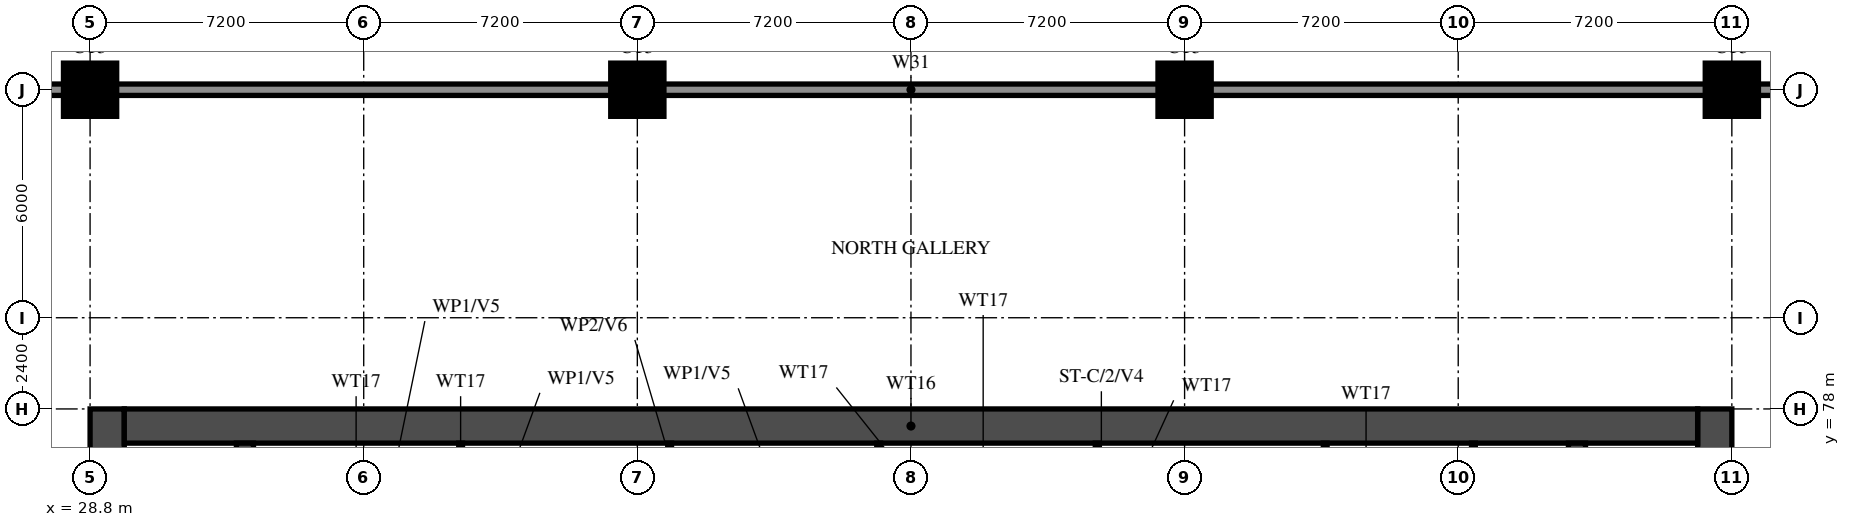
"""IFC4 building model, lengths in metres.
Left out: names, types, materials, properties, quantities, classifications, styles, units other than length and angle.
Written with IfcOpenShell. Run it as: python <this file> out.ifc"""

import sys

from ifc_helpers import new_model, si_unit, direction, frame, frame_2d, origin, origin_2d, place, context, subcontext, project, spatial, rectangle, circle, extrude, source, transform, mapped, element, save


model = new_model("IFC4")
c1 = context("Model", 3, precision=1e-05, world=origin(), true_north=direction((0.0, 1.0)))
c2 = subcontext(c1, "Body", "Model", "MODEL_VIEW")
j1 = project(units=[si_unit("LENGTHUNIT", "METRE"), si_unit("PLANEANGLEUNIT", "RADIAN")], contexts=[c1])
p1 = place(None, origin())
s1 = spatial("IfcSite", under=j1, at=p1, CompositionType="ELEMENT")
p2 = place(p1, origin())
s2 = spatial("IfcBuilding", under=s1, at=p2, CompositionType="ELEMENT")
p3 = place(p2, frame((0.0, 0.0, 13.2)))
s3 = spatial("IfcBuildingStorey", under=s2, at=p3, CompositionType="ELEMENT", Elevation=13.2)
m1 = source(origin(), c2, "Body", "SweptSolid", [
    extrude(circle(Radius=0.7, at=origin_2d()), origin(), (0.0, 0.0, 1.0), 3.8),
])
for number, where, z_axis, x_axis in (
    (1, (28.8, 86.4, 0.0), (0.0, 0.0, 1.0), (1.0, 0.0, 0.0)),
    (2, (43.2, 86.4, 0.0), (0.0, 0.0, 1.0), (1.0, 0.0, 0.0)),
    (3, (57.6, 86.4, 0.0), (0.0, 0.0, 1.0), (1.0, 0.0, 0.0)),
    (4, (72.0, 86.4, 0.0), (0.0, 0.0, 1.0), (1.0, 0.0, 0.0)),
):
    element("IfcColumn", number, at=place(p3, frame(where, z_axis=z_axis, x_axis=x_axis)), inside=s3, PredefinedType="COLUMN", context=c2, shape_type="MappedRepresentation", body=[
        mapped(m1, transform((0.0, 0.0, 0.0))),
    ])
for number, where, z_axis, x_axis in (
    (5, (29.25, 66.0, 0.0), (0.0, 0.0, 1.0), (0.0, 1.0, 0.0)),
    (6, (71.55, 66.0, 0.0), (0.0, 0.0, 1.0), (0.0, 1.0, 0.0)),
):
    element("IfcWall", number, at=place(p3, frame(where, z_axis=z_axis, x_axis=x_axis)), inside=s3, PredefinedType="SHEAR", context=c2, shape_type="SweptSolid", body=[
        extrude(rectangle(XDim=12.0, YDim=0.9, at=frame_2d((6.0, 0.0))), origin(), (0.0, 0.0, 1.0), 3.8),
    ])
p4 = place(p3, frame((29.7, 77.55, 0.0), z_axis=(0.0, 0.0, 1.0), x_axis=(1.0, 0.0, 0.0)))
e7 = element("IfcWall", 7, at=p4, inside=s3, PredefinedType="SHEAR", context=c2, shape_type="SweptSolid", body=[
    extrude(rectangle(XDim=41.4, YDim=0.9, at=frame_2d((20.7, 0.0))), origin(), (0.0, 0.0, 1.0), 3.8),
])
p5 = place(p3, frame((32.875, 66.45, 0.0), z_axis=(0.0, 0.0, 1.0), x_axis=(0.0, 1.0, 0.0)))
e8 = element("IfcWall", 8, at=p5, inside=s3, PredefinedType="SHEAR", context=c2, shape_type="SweptSolid", body=[
    extrude(rectangle(XDim=10.65, YDim=0.45, at=frame_2d((5.325, 0.0))), origin(), (0.0, 0.0, 1.0), 3.8),
])
p6 = place(p3, frame((67.925, 66.45, 0.0), z_axis=(0.0, 0.0, 1.0), x_axis=(0.0, 1.0, 0.0)))
e9 = element("IfcWall", 9, at=p6, inside=s3, PredefinedType="SHEAR", context=c2, shape_type="SweptSolid", body=[
    extrude(rectangle(XDim=10.65, YDim=0.45, at=frame_2d((5.325, 0.0))), origin(), (0.0, 0.0, 1.0), 3.8),
])
p7 = place(p6, frame((0.15, 0.0, 0.0)))
e10 = element("IfcOpeningElement", 10, at=p7, cuts=e9, PredefinedType="OPENING", context=c2, shape_type="SweptSolid", body=[
    extrude(rectangle(XDim=1.1, YDim=2.1, at=frame_2d((0.55, 1.05))), frame((0.0, 0.235, 0.0), z_axis=(0.0, -1.0, 0.0), x_axis=(1.0, 0.0, 0.0)), (0.0, 0.0, 1.0), 0.47),
])
for number, where, z_axis, x_axis in (
    (11, (38.55, 76.325, 0.0), (0.0, 0.0, 1.0), (0.0, 1.0, 0.0)),
    (12, (44.05, 76.325, 0.0), (0.0, 0.0, 1.0), (0.0, 1.0, 0.0)),
    (13, (49.55, 76.325, 0.0), (0.0, 0.0, 1.0), (0.0, 1.0, 0.0)),
    (14, (55.3, 76.325, 0.0), (0.0, 0.0, 1.0), (0.0, 1.0, 0.0)),
    (15, (61.3, 76.325, 0.0), (0.0, 0.0, 1.0), (0.0, 1.0, 0.0)),
    (16, (65.2, 76.325, 0.0), (0.0, 0.0, 1.0), (0.0, 1.0, 0.0)),
):
    element("IfcWall", number, at=place(p3, frame(where, z_axis=z_axis, x_axis=x_axis)), inside=s3, PredefinedType="PARTITIONING", context=c2, shape_type="SweptSolid", body=[
        extrude(rectangle(XDim=0.775, YDim=0.1, at=frame_2d((0.388, 0.0))), origin(), (0.0, 0.0, 1.0), 3.8),
    ])
p8 = place(p3, frame((0.0, 86.4, 0.0), z_axis=(0.0, 0.0, 1.0), x_axis=(1.0, 0.0, 0.0)))
e17 = element("IfcWall", 17, at=p8, inside=s3, PredefinedType="SOLIDWALL", context=c2, shape_type="SweptSolid", body=[
    extrude(rectangle(XDim=100.8, YDim=0.3, at=frame_2d((50.4, 0.0))), origin(), (0.0, 0.0, 1.0), 3.8),
])
p9 = place(p8, frame((2.4, 0.0, 0.6)))
e18 = element("IfcOpeningElement", 18, at=p9, cuts=e17, PredefinedType="OPENING", context=c2, shape_type="SweptSolid", body=[
    extrude(rectangle(XDim=1.8, YDim=2.4, at=frame_2d((0.9, 1.2))), frame((0.0, 0.16, 0.0), z_axis=(0.0, -1.0, 0.0), x_axis=(1.0, 0.0, 0.0)), (0.0, 0.0, 1.0), 0.32),
])
p10 = place(p8, frame((6.0, 0.0, 0.6)))
e19 = element("IfcOpeningElement", 19, at=p10, cuts=e17, PredefinedType="OPENING", context=c2, shape_type="SweptSolid", body=[
    extrude(rectangle(XDim=1.8, YDim=2.4, at=frame_2d((0.9, 1.2))), frame((0.0, 0.16, 0.0), z_axis=(0.0, -1.0, 0.0), x_axis=(1.0, 0.0, 0.0)), (0.0, 0.0, 1.0), 0.32),
])
p11 = place(p8, frame((9.6, 0.0, 0.6)))
e20 = element("IfcOpeningElement", 20, at=p11, cuts=e17, PredefinedType="OPENING", context=c2, shape_type="SweptSolid", body=[
    extrude(rectangle(XDim=1.8, YDim=2.4, at=frame_2d((0.9, 1.2))), frame((0.0, 0.16, 0.0), z_axis=(0.0, -1.0, 0.0), x_axis=(1.0, 0.0, 0.0)), (0.0, 0.0, 1.0), 0.32),
])
p12 = place(p8, frame((16.8, 0.0, 0.6)))
e21 = element("IfcOpeningElement", 21, at=p12, cuts=e17, PredefinedType="OPENING", context=c2, shape_type="SweptSolid", body=[
    extrude(rectangle(XDim=1.8, YDim=2.4, at=frame_2d((0.9, 1.2))), frame((0.0, 0.16, 0.0), z_axis=(0.0, -1.0, 0.0), x_axis=(1.0, 0.0, 0.0)), (0.0, 0.0, 1.0), 0.32),
])
p13 = place(p8, frame((20.4, 0.0, 0.6)))
e22 = element("IfcOpeningElement", 22, at=p13, cuts=e17, PredefinedType="OPENING", context=c2, shape_type="SweptSolid", body=[
    extrude(rectangle(XDim=1.8, YDim=2.4, at=frame_2d((0.9, 1.2))), frame((0.0, 0.16, 0.0), z_axis=(0.0, -1.0, 0.0), x_axis=(1.0, 0.0, 0.0)), (0.0, 0.0, 1.0), 0.32),
])
p14 = place(p8, frame((78.0, 0.0, 0.6)))
e23 = element("IfcOpeningElement", 23, at=p14, cuts=e17, PredefinedType="OPENING", context=c2, shape_type="SweptSolid", body=[
    extrude(rectangle(XDim=1.8, YDim=2.4, at=frame_2d((0.9, 1.2))), frame((0.0, 0.16, 0.0), z_axis=(0.0, -1.0, 0.0), x_axis=(1.0, 0.0, 0.0)), (0.0, 0.0, 1.0), 0.32),
])
p15 = place(p8, frame((81.6, 0.0, 0.6)))
e24 = element("IfcOpeningElement", 24, at=p15, cuts=e17, PredefinedType="OPENING", context=c2, shape_type="SweptSolid", body=[
    extrude(rectangle(XDim=1.8, YDim=2.4, at=frame_2d((0.9, 1.2))), frame((0.0, 0.16, 0.0), z_axis=(0.0, -1.0, 0.0), x_axis=(1.0, 0.0, 0.0)), (0.0, 0.0, 1.0), 0.32),
])
p16 = place(p8, frame((88.8, 0.0, 0.6)))
e25 = element("IfcOpeningElement", 25, at=p16, cuts=e17, PredefinedType="OPENING", context=c2, shape_type="SweptSolid", body=[
    extrude(rectangle(XDim=1.8, YDim=2.4, at=frame_2d((0.9, 1.2))), frame((0.0, 0.16, 0.0), z_axis=(0.0, -1.0, 0.0), x_axis=(1.0, 0.0, 0.0)), (0.0, 0.0, 1.0), 0.32),
])
p17 = place(p8, frame((92.4, 0.0, 0.6)))
e26 = element("IfcOpeningElement", 26, at=p17, cuts=e17, PredefinedType="OPENING", context=c2, shape_type="SweptSolid", body=[
    extrude(rectangle(XDim=1.8, YDim=2.4, at=frame_2d((0.9, 1.2))), frame((0.0, 0.16, 0.0), z_axis=(0.0, -1.0, 0.0), x_axis=(1.0, 0.0, 0.0)), (0.0, 0.0, 1.0), 0.32),
])
p18 = place(p8, frame((96.0, 0.0, 0.6)))
e27 = element("IfcOpeningElement", 27, at=p18, cuts=e17, PredefinedType="OPENING", context=c2, shape_type="SweptSolid", body=[
    extrude(rectangle(XDim=1.8, YDim=2.4, at=frame_2d((0.9, 1.2))), frame((0.0, 0.16, 0.0), z_axis=(0.0, -1.0, 0.0), x_axis=(1.0, 0.0, 0.0)), (0.0, 0.0, 1.0), 0.32),
])
save(model, sys.argv[1])
